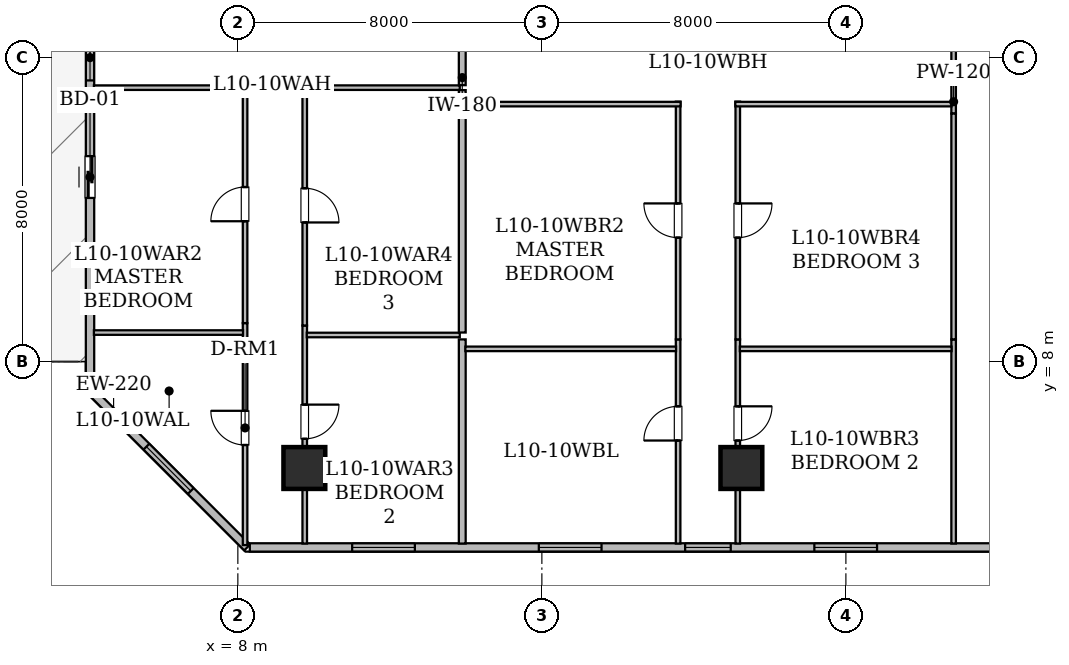
"""IFC4 building model, lengths in metres.
Left out: names, types, materials, properties, quantities, classifications, styles, units other than length and angle.
Written with IfcOpenShell. Run it as: python <this file> out.ifc"""

import sys

from ifc_helpers import new_model, si_unit, direction, frame, frame_2d, origin, origin_2d, place, context, subcontext, project, spatial, rectangle, hollow_rectangle, extrude, element, fill, save


model = new_model("IFC4")
c1 = context("Model", 3, precision=1e-05, world=origin(), true_north=direction((0.0, 1.0)))
c2 = subcontext(c1, "Body", "Model", "MODEL_VIEW")
j1 = project(units=[si_unit("LENGTHUNIT", "METRE"), si_unit("PLANEANGLEUNIT", "RADIAN")], contexts=[c1])
p1 = place(None, origin())
s1 = spatial("IfcSite", under=j1, at=p1, CompositionType="ELEMENT")
p2 = place(p1, origin())
s2 = spatial("IfcBuilding", under=s1, at=p2, CompositionType="ELEMENT")
p3 = place(p2, frame((0.0, 0.0, 44.25)))
s3 = spatial("IfcBuildingStorey", under=s2, at=p3, CompositionType="ELEMENT", Elevation=44.25)
for number, where, z_axis, x_axis in (
    (1, (9.75, 5.2, 0.0), (0.0, 0.0, 1.0), (1.0, 0.0, 0.0)),
    (2, (21.25, 5.2, 0.0), (0.0, 0.0, 1.0), (1.0, 0.0, 0.0)),
):
    element("IfcColumn", number, at=place(p3, frame(where, z_axis=z_axis, x_axis=x_axis)), inside=s3, PredefinedType="COLUMN", context=c2, shape_type="SweptSolid", body=[
        extrude(hollow_rectangle(XDim=1.1, YDim=1.1, WallThickness=0.055, at=origin_2d()), origin(), (0.0, 0.0, 1.0), 3.65),
    ])
p4 = place(p3, frame((8.246, 3.11, 0.0), z_axis=(0.0, 0.0, 1.0), x_axis=(-0.707106781187, 0.707106781187, 0.0)))
e3 = element("IfcWall", 3, at=p4, inside=s3, PredefinedType="STANDARD", context=c2, shape_type="SweptSolid", body=[
    extrude(rectangle(XDim=5.849, YDim=0.22, at=frame_2d((2.925, 0.0))), origin(), (0.0, 0.0, 1.0), 3.43),
])
p5 = place(p4, frame((2.1, 0.0, 0.85)))
e4 = element("IfcOpeningElement", 4, at=p5, cuts=e3, PredefinedType="OPENING", context=c2, shape_type="SweptSolid", body=[
    extrude(rectangle(XDim=1.65, YDim=1.55, at=frame_2d((0.825, 0.775))), frame((0.0, 0.12, 0.0), z_axis=(0.0, -1.0, 0.0), x_axis=(1.0, 0.0, 0.0)), (0.0, 0.0, 1.0), 0.24),
])
p6 = place(p3, frame((4.11, 7.317, 0.0), z_axis=(0.0, 0.0, 1.0), x_axis=(0.0, 1.0, 0.0)))
e5 = element("IfcWall", 5, at=p6, inside=s3, PredefinedType="STANDARD", context=c2, shape_type="SweptSolid", body=[
    extrude(rectangle(XDim=17.446, YDim=0.22, at=frame_2d((8.723, 0.0))), origin(), (0.0, 0.0, 1.0), 3.43),
])
p7 = place(p6, frame((4.989, 0.0, 0.0)))
e6 = element("IfcOpeningElement", 6, at=p7, cuts=e5, PredefinedType="OPENING", context=c2, shape_type="SweptSolid", body=[
    extrude(rectangle(XDim=1.1, YDim=2.2, at=frame_2d((0.55, 1.1))), frame((0.0, 0.12, 0.0), z_axis=(0.0, -1.0, 0.0), x_axis=(1.0, 0.0, 0.0)), (0.0, 0.0, 1.0), 0.24),
])
p8 = place(p6, frame((8.081, 0.0, 0.8)))
e7 = element("IfcOpeningElement", 7, at=p8, cuts=e5, PredefinedType="OPENING", context=c2, shape_type="SweptSolid", body=[
    extrude(rectangle(XDim=1.2, YDim=1.5, at=frame_2d((0.6, 0.75))), frame((0.0, 0.12, 0.0), z_axis=(0.0, -1.0, 0.0), x_axis=(1.0, 0.0, 0.0)), (0.0, 0.0, 1.0), 0.24),
])
p9 = place(p3, frame((45.683, 3.11, 0.0), z_axis=(0.0, 0.0, 1.0), x_axis=(-1.0, 0.0, 0.0)))
e8 = element("IfcWall", 8, at=p9, inside=s3, PredefinedType="STANDARD", context=c2, shape_type="SweptSolid", body=[
    extrude(rectangle(XDim=37.368, YDim=0.22, at=frame_2d((18.684, 0.0))), origin(), (0.0, 0.0, 1.0), 3.43),
])
p10 = place(p9, frame((14.508, 0.0, 0.85)))
e9 = element("IfcOpeningElement", 9, at=p10, cuts=e8, PredefinedType="OPENING", context=c2, shape_type="SweptSolid", body=[
    extrude(rectangle(XDim=1.65, YDim=1.55, at=frame_2d((0.825, 0.775))), frame((0.0, 0.12, 0.0), z_axis=(0.0, -1.0, 0.0), x_axis=(1.0, 0.0, 0.0)), (0.0, 0.0, 1.0), 0.24),
])
p11 = place(p9, frame((33.025, 0.0, 0.85)))
e10 = element("IfcOpeningElement", 10, at=p11, cuts=e8, PredefinedType="OPENING", context=c2, shape_type="SweptSolid", body=[
    extrude(rectangle(XDim=1.65, YDim=1.55, at=frame_2d((0.825, 0.775))), frame((0.0, 0.12, 0.0), z_axis=(0.0, -1.0, 0.0), x_axis=(1.0, 0.0, 0.0)), (0.0, 0.0, 1.0), 0.24),
])
p12 = place(p9, frame((24.713, 0.0, 0.8)))
e11 = element("IfcOpeningElement", 11, at=p12, cuts=e8, PredefinedType="OPENING", context=c2, shape_type="SweptSolid", body=[
    extrude(rectangle(XDim=1.2, YDim=1.5, at=frame_2d((0.6, 0.75))), frame((0.0, 0.12, 0.0), z_axis=(0.0, -1.0, 0.0), x_axis=(1.0, 0.0, 0.0)), (0.0, 0.0, 1.0), 0.24),
])
p13 = place(p9, frame((28.113, 0.0, 0.85)))
e12 = element("IfcOpeningElement", 12, at=p13, cuts=e8, PredefinedType="OPENING", context=c2, shape_type="SweptSolid", body=[
    extrude(rectangle(XDim=1.65, YDim=1.55, at=frame_2d((0.825, 0.775))), frame((0.0, 0.12, 0.0), z_axis=(0.0, -1.0, 0.0), x_axis=(1.0, 0.0, 0.0)), (0.0, 0.0, 1.0), 0.24),
])
p14 = place(p9, frame((20.863, 0.0, 0.85)))
e13 = element("IfcOpeningElement", 13, at=p14, cuts=e8, PredefinedType="OPENING", context=c2, shape_type="SweptSolid", body=[
    extrude(rectangle(XDim=1.65, YDim=1.55, at=frame_2d((0.825, 0.775))), frame((0.0, 0.12, 0.0), z_axis=(0.0, -1.0, 0.0), x_axis=(1.0, 0.0, 0.0)), (0.0, 0.0, 1.0), 0.24),
])
p15 = place(p9, frame((10.428, 0.0, 0.8)))
e14 = element("IfcOpeningElement", 14, at=p15, cuts=e8, PredefinedType="OPENING", context=c2, shape_type="SweptSolid", body=[
    extrude(rectangle(XDim=1.2, YDim=1.5, at=frame_2d((0.6, 0.75))), frame((0.0, 0.12, 0.0), z_axis=(0.0, -1.0, 0.0), x_axis=(1.0, 0.0, 0.0)), (0.0, 0.0, 1.0), 0.24),
])
p16 = place(p9, frame((6.453, 0.0, 0.85)))
e15 = element("IfcOpeningElement", 15, at=p16, cuts=e8, PredefinedType="OPENING", context=c2, shape_type="SweptSolid", body=[
    extrude(rectangle(XDim=1.65, YDim=1.55, at=frame_2d((0.825, 0.775))), frame((0.0, 0.12, 0.0), z_axis=(0.0, -1.0, 0.0), x_axis=(1.0, 0.0, 0.0)), (0.0, 0.0, 1.0), 0.24),
])
p17 = place(p9, frame((2.157, 0.0, 0.85)))
e16 = element("IfcOpeningElement", 16, at=p17, cuts=e8, PredefinedType="OPENING", context=c2, shape_type="SweptSolid", body=[
    extrude(rectangle(XDim=1.65, YDim=1.55, at=frame_2d((0.825, 0.775))), frame((0.0, 0.12, 0.0), z_axis=(0.0, -1.0, 0.0), x_axis=(1.0, 0.0, 0.0)), (0.0, 0.0, 1.0), 0.24),
])
p18 = place(p3, frame((26.835, 14.526, 0.0), z_axis=(0.0, 0.0, 1.0), x_axis=(0.0, 1.0, 0.0)))
e17 = element("IfcWall", 17, at=p18, inside=s3, PredefinedType="PARTITIONING", context=c2, shape_type="SweptSolid", body=[
    extrude(rectangle(XDim=2.078, YDim=0.12, at=frame_2d((1.039, 0.0))), origin(), (0.0, 0.0, 1.0), 3.43),
])
p19 = place(p3, frame((26.835, 3.212, 0.0), z_axis=(0.0, 0.0, 1.0), x_axis=(0.0, 1.0, 0.0)))
e18 = element("IfcWall", 18, at=p19, inside=s3, PredefinedType="PARTITIONING", context=c2, shape_type="SweptSolid", body=[
    extrude(rectangle(XDim=5.372, YDim=0.12, at=frame_2d((2.686, 0.0))), origin(), (0.0, 0.0, 1.0), 2.803),
])
p20 = place(p3, frame((26.835, 8.584, 0.0), z_axis=(0.0, 0.0, 1.0), x_axis=(0.0, 1.0, 0.0)))
e19 = element("IfcWall", 19, at=p20, inside=s3, PredefinedType="PARTITIONING", context=c2, shape_type="SweptSolid", body=[
    extrude(rectangle(XDim=5.942, YDim=0.12, at=frame_2d((2.971, 0.0))), origin(), (0.0, 0.0, 1.0), 3.43),
])
p21 = place(p3, frame((8.19, 3.172, 0.0), z_axis=(0.0, 0.0, 1.0), x_axis=(0.0, 1.0, 0.0)))
e20 = element("IfcWall", 20, at=p21, inside=s3, PredefinedType="PARTITIONING", context=c2, shape_type="SweptSolid", body=[
    extrude(rectangle(XDim=5.841, YDim=0.12, at=frame_2d((2.92, 0.0))), origin(), (0.0, 0.0, 1.0), 2.803),
])
p22 = place(p21, frame((2.633, 0.0, 0.0)))
e21 = element("IfcOpeningElement", 21, at=p22, cuts=e20, PredefinedType="OPENING", context=c2, shape_type="SweptSolid", body=[
    extrude(rectangle(XDim=0.9, YDim=2.1, at=frame_2d((0.45, 1.05))), frame((0.0, 0.07, 0.0), z_axis=(0.0, -1.0, 0.0), x_axis=(1.0, 0.0, 0.0)), (0.0, 0.0, 1.0), 0.14),
])
p23 = place(p3, frame((8.19, 9.013, 0.0), z_axis=(0.0, 0.0, 1.0), x_axis=(0.0, 1.0, 0.0)))
e22 = element("IfcWall", 22, at=p23, inside=s3, PredefinedType="PARTITIONING", context=c2, shape_type="SweptSolid", body=[
    extrude(rectangle(XDim=6.26, YDim=0.12, at=frame_2d((3.13, 0.0))), origin(), (0.0, 0.0, 1.0), 2.803),
])
p24 = place(p23, frame((2.68, 0.0, 0.0)))
e23 = element("IfcOpeningElement", 23, at=p24, cuts=e22, PredefinedType="OPENING", context=c2, shape_type="SweptSolid", body=[
    extrude(rectangle(XDim=0.9, YDim=2.1, at=frame_2d((0.45, 1.05))), frame((0.0, 0.07, 0.0), z_axis=(0.0, -1.0, 0.0), x_axis=(1.0, 0.0, 0.0)), (0.0, 0.0, 1.0), 0.14),
])
p25 = place(p3, frame((8.255, 15.208, 0.0), z_axis=(0.0, 0.0, 1.0), x_axis=(-1.0, 0.0, 0.0)))
e24 = element("IfcWall", 24, at=p25, inside=s3, PredefinedType="PARTITIONING", context=c2, shape_type="SweptSolid", body=[
    extrude(rectangle(XDim=4.043, YDim=0.12, at=frame_2d((2.021, 0.0))), origin(), (0.0, 0.0, 1.0), 2.803),
])
p26 = place(p3, frame((9.76, 8.949, 0.0), z_axis=(0.0, 0.0, 1.0), x_axis=(0.0, -1.0, 0.0)))
e25 = element("IfcWall", 25, at=p26, inside=s3, PredefinedType="PARTITIONING", context=c2, shape_type="SweptSolid", body=[
    extrude(rectangle(XDim=5.737, YDim=0.12, at=frame_2d((2.869, 0.0))), origin(), (0.0, 0.0, 1.0), 2.647),
])
p27 = place(p26, frame((2.081, 0.0, 0.0)))
e26 = element("IfcOpeningElement", 26, at=p27, cuts=e25, PredefinedType="OPENING", context=c2, shape_type="SweptSolid", body=[
    extrude(rectangle(XDim=0.9, YDim=2.1, at=frame_2d((0.45, 1.05))), frame((0.0, 0.07, 0.0), z_axis=(0.0, -1.0, 0.0), x_axis=(1.0, 0.0, 0.0)), (0.0, 0.0, 1.0), 0.14),
])
p28 = place(p3, frame((9.76, 15.273, 0.0), z_axis=(0.0, 0.0, 1.0), x_axis=(0.0, -1.0, 0.0)))
e27 = element("IfcWall", 27, at=p28, inside=s3, PredefinedType="PARTITIONING", context=c2, shape_type="SweptSolid", body=[
    extrude(rectangle(XDim=6.324, YDim=0.12, at=frame_2d((3.162, 0.0))), origin(), (0.0, 0.0, 1.0), 3.43),
])
p29 = place(p28, frame((2.712, 0.0, 0.0)))
e28 = element("IfcOpeningElement", 28, at=p29, cuts=e27, PredefinedType="OPENING", context=c2, shape_type="SweptSolid", body=[
    extrude(rectangle(XDim=0.9, YDim=2.1, at=frame_2d((0.45, 1.05))), frame((0.0, 0.07, 0.0), z_axis=(0.0, -1.0, 0.0), x_axis=(1.0, 0.0, 0.0)), (0.0, 0.0, 1.0), 0.14),
])
p30 = place(p3, frame((13.84, 15.208, 0.0), z_axis=(0.0, 0.0, 1.0), x_axis=(-1.0, 0.0, 0.0)))
e29 = element("IfcWall", 29, at=p30, inside=s3, PredefinedType="PARTITIONING", context=c2, shape_type="SweptSolid", body=[
    extrude(rectangle(XDim=4.145, YDim=0.12, at=frame_2d((2.073, 0.0))), origin(), (0.0, 0.0, 1.0), 3.43),
])
p31 = place(p3, frame((13.905, 16.604, 0.0), z_axis=(0.0, 0.0, 1.0), x_axis=(0.0, -1.0, 0.0)))
e30 = element("IfcWall", 30, at=p31, inside=s3, PredefinedType="STANDARD", context=c2, shape_type="SweptSolid", body=[
    extrude(rectangle(XDim=1.331, YDim=0.18, at=frame_2d((0.666, 0.0))), origin(), (0.0, 0.0, 1.0), 3.43),
])
p32 = place(p3, frame((4.212, 8.764, 0.0), z_axis=(0.0, 0.0, 1.0), x_axis=(1.0, 0.0, 0.0)))
e31 = element("IfcWall", 31, at=p32, inside=s3, PredefinedType="PARTITIONING", context=c2, shape_type="SweptSolid", body=[
    extrude(rectangle(XDim=3.924, YDim=0.12, at=frame_2d((1.962, 0.0))), origin(), (0.0, 0.0, 1.0), 3.43),
])
p33 = place(p3, frame((9.814, 8.7, 0.0), z_axis=(0.0, 0.0, 1.0), x_axis=(1.0, 0.0, 0.0)))
e32 = element("IfcWall", 32, at=p33, inside=s3, PredefinedType="PARTITIONING", context=c2, shape_type="SweptSolid", body=[
    extrude(rectangle(XDim=4.026, YDim=0.12, at=frame_2d((2.013, 0.0))), origin(), (0.0, 0.0, 1.0), 2.647),
])
p34 = place(p3, frame((13.905, 8.584, 0.0), z_axis=(0.0, 0.0, 1.0), x_axis=(0.0, -1.0, 0.0)))
e33 = element("IfcWall", 33, at=p34, inside=s3, PredefinedType="STANDARD", context=c2, shape_type="SweptSolid", body=[
    extrude(rectangle(XDim=5.372, YDim=0.18, at=frame_2d((2.686, 0.0))), origin(), (0.0, 0.0, 1.0), 2.803),
])
p35 = place(p3, frame((13.905, 15.143, 0.0), z_axis=(0.0, 0.0, 1.0), x_axis=(0.0, -1.0, 0.0)))
e34 = element("IfcWall", 34, at=p35, inside=s3, PredefinedType="STANDARD", context=c2, shape_type="SweptSolid", body=[
    extrude(rectangle(XDim=0.617, YDim=0.18, at=frame_2d((0.309, 0.0))), origin(), (0.0, 0.0, 1.0), 3.43),
])
p36 = place(p3, frame((13.905, 14.526, 0.0), z_axis=(0.0, 0.0, 1.0), x_axis=(0.0, -1.0, 0.0)))
e35 = element("IfcWall", 35, at=p36, inside=s3, PredefinedType="STANDARD", context=c2, shape_type="SweptSolid", body=[
    extrude(rectangle(XDim=5.761, YDim=0.18, at=frame_2d((2.88, 0.0))), origin(), (0.0, 0.0, 1.0), 2.647),
])
p37 = place(p3, frame((19.585, 3.212, 0.0), z_axis=(0.0, 0.0, 1.0), x_axis=(0.0, 1.0, 0.0)))
e36 = element("IfcWall", 36, at=p37, inside=s3, PredefinedType="PARTITIONING", context=c2, shape_type="SweptSolid", body=[
    extrude(rectangle(XDim=5.372, YDim=0.12, at=frame_2d((2.686, 0.0))), origin(), (0.0, 0.0, 1.0), 2.803),
])
p38 = place(p37, frame((2.711, 0.0, 0.0)))
e37 = element("IfcOpeningElement", 37, at=p38, cuts=e36, PredefinedType="OPENING", context=c2, shape_type="SweptSolid", body=[
    extrude(rectangle(XDim=0.9, YDim=2.1, at=frame_2d((0.45, 1.05))), frame((0.0, 0.07, 0.0), z_axis=(0.0, -1.0, 0.0), x_axis=(1.0, 0.0, 0.0)), (0.0, 0.0, 1.0), 0.14),
])
p39 = place(p3, frame((19.585, 8.584, 0.0), z_axis=(0.0, 0.0, 1.0), x_axis=(0.0, 1.0, 0.0)))
e38 = element("IfcWall", 38, at=p39, inside=s3, PredefinedType="PARTITIONING", context=c2, shape_type="SweptSolid", body=[
    extrude(rectangle(XDim=6.256, YDim=0.12, at=frame_2d((3.128, 0.0))), origin(), (0.0, 0.0, 1.0), 2.647),
])
p40 = place(p39, frame((2.678, 0.0, 0.0)))
e39 = element("IfcOpeningElement", 39, at=p40, cuts=e38, PredefinedType="OPENING", context=c2, shape_type="SweptSolid", body=[
    extrude(rectangle(XDim=0.9, YDim=2.1, at=frame_2d((0.45, 1.05))), frame((0.0, 0.07, 0.0), z_axis=(0.0, -1.0, 0.0), x_axis=(1.0, 0.0, 0.0)), (0.0, 0.0, 1.0), 0.14),
])
p41 = place(p3, frame((19.65, 14.775, 0.0), z_axis=(0.0, 0.0, 1.0), x_axis=(-1.0, 0.0, 0.0)))
e40 = element("IfcWall", 40, at=p41, inside=s3, PredefinedType="PARTITIONING", context=c2, shape_type="SweptSolid", body=[
    extrude(rectangle(XDim=5.663, YDim=0.12, at=frame_2d((2.832, 0.0))), origin(), (0.0, 0.0, 1.0), 2.647),
])
p42 = place(p3, frame((21.155, 8.584, 0.0), z_axis=(0.0, 0.0, 1.0), x_axis=(0.0, -1.0, 0.0)))
e41 = element("IfcWall", 41, at=p42, inside=s3, PredefinedType="PARTITIONING", context=c2, shape_type="SweptSolid", body=[
    extrude(rectangle(XDim=5.372, YDim=0.12, at=frame_2d((2.686, 0.0))), origin(), (0.0, 0.0, 1.0), 2.647),
])
p43 = place(p42, frame((1.761, 0.0, 0.0)))
e42 = element("IfcOpeningElement", 42, at=p43, cuts=e41, PredefinedType="OPENING", context=c2, shape_type="SweptSolid", body=[
    extrude(rectangle(XDim=0.9, YDim=2.1, at=frame_2d((0.45, 1.05))), frame((0.0, 0.07, 0.0), z_axis=(0.0, -1.0, 0.0), x_axis=(1.0, 0.0, 0.0)), (0.0, 0.0, 1.0), 0.14),
])
p44 = place(p3, frame((21.155, 14.84, 0.0), z_axis=(0.0, 0.0, 1.0), x_axis=(0.0, -1.0, 0.0)))
e43 = element("IfcWall", 43, at=p44, inside=s3, PredefinedType="PARTITIONING", context=c2, shape_type="SweptSolid", body=[
    extrude(rectangle(XDim=6.256, YDim=0.12, at=frame_2d((3.128, 0.0))), origin(), (0.0, 0.0, 1.0), 3.43),
])
p45 = place(p44, frame((2.678, 0.0, 0.0)))
e44 = element("IfcOpeningElement", 44, at=p45, cuts=e43, PredefinedType="OPENING", context=c2, shape_type="SweptSolid", body=[
    extrude(rectangle(XDim=0.9, YDim=2.1, at=frame_2d((0.45, 1.05))), frame((0.0, 0.07, 0.0), z_axis=(0.0, -1.0, 0.0), x_axis=(1.0, 0.0, 0.0)), (0.0, 0.0, 1.0), 0.14),
])
p46 = place(p3, frame((26.781, 14.775, 0.0), z_axis=(0.0, 0.0, 1.0), x_axis=(-1.0, 0.0, 0.0)))
e45 = element("IfcWall", 45, at=p46, inside=s3, PredefinedType="PARTITIONING", context=c2, shape_type="SweptSolid", body=[
    extrude(rectangle(XDim=5.691, YDim=0.12, at=frame_2d((2.845, 0.0))), origin(), (0.0, 0.0, 1.0), 3.43),
])
p47 = place(p3, frame((13.987, 8.335, 0.0), z_axis=(0.0, 0.0, 1.0), x_axis=(1.0, 0.0, 0.0)))
e46 = element("IfcWall", 46, at=p47, inside=s3, PredefinedType="PARTITIONING", context=c2, shape_type="SweptSolid", body=[
    extrude(rectangle(XDim=5.544, YDim=0.12, at=frame_2d((2.772, 0.0))), origin(), (0.0, 0.0, 1.0), 3.43),
])
p48 = place(p3, frame((21.209, 8.335, 0.0), z_axis=(0.0, 0.0, 1.0), x_axis=(1.0, 0.0, 0.0)))
e47 = element("IfcWall", 47, at=p48, inside=s3, PredefinedType="PARTITIONING", context=c2, shape_type="SweptSolid", body=[
    extrude(rectangle(XDim=5.572, YDim=0.12, at=frame_2d((2.786, 0.0))), origin(), (0.0, 0.0, 1.0), 3.43),
])
p49 = place(p7, origin())
e48 = element("IfcDoor", 48, at=p49, inside=s3, OperationType="SLIDING_TO_LEFT", PredefinedType="DOOR", context=c2, shape_type="SweptSolid", body=[
    extrude(rectangle(XDim=1.1, YDim=2.2, at=frame_2d((0.55, 1.1))), frame((0.0, 0.025, 0.0), z_axis=(0.0, -1.0, 0.0), x_axis=(1.0, 0.0, 0.0)), (0.0, 0.0, 1.0), 0.05),
])
fill(e6, e48)
p50 = place(p8, origin())
e49 = element("IfcWindow", 49, at=p50, inside=s3, PartitioningType="SINGLE_PANEL", PredefinedType="WINDOW", context=c2, shape_type="SweptSolid", body=[
    extrude(rectangle(XDim=1.2, YDim=1.5, at=frame_2d((0.6, 0.75))), frame((0.0, 0.03, 0.0), z_axis=(0.0, -1.0, 0.0), x_axis=(1.0, 0.0, 0.0)), (0.0, 0.0, 1.0), 0.06),
])
fill(e7, e49)
p51 = place(p5, origin())
e50 = element("IfcWindow", 50, at=p51, inside=s3, PartitioningType="SINGLE_PANEL", PredefinedType="WINDOW", context=c2, shape_type="SweptSolid", body=[
    extrude(rectangle(XDim=1.65, YDim=1.55, at=frame_2d((0.825, 0.775))), frame((0.0, 0.03, 0.0), z_axis=(0.0, -1.0, 0.0), x_axis=(1.0, 0.0, 0.0)), (0.0, 0.0, 1.0), 0.06),
])
fill(e4, e50)
p52 = place(p11, origin())
e51 = element("IfcWindow", 51, at=p52, inside=s3, PartitioningType="SINGLE_PANEL", PredefinedType="WINDOW", context=c2, shape_type="SweptSolid", body=[
    extrude(rectangle(XDim=1.65, YDim=1.55, at=frame_2d((0.825, 0.775))), frame((0.0, 0.03, 0.0), z_axis=(0.0, -1.0, 0.0), x_axis=(1.0, 0.0, 0.0)), (0.0, 0.0, 1.0), 0.06),
])
fill(e10, e51)
p53 = place(p12, origin())
e52 = element("IfcWindow", 52, at=p53, inside=s3, PartitioningType="SINGLE_PANEL", PredefinedType="WINDOW", context=c2, shape_type="SweptSolid", body=[
    extrude(rectangle(XDim=1.2, YDim=1.5, at=frame_2d((0.6, 0.75))), frame((0.0, 0.03, 0.0), z_axis=(0.0, -1.0, 0.0), x_axis=(1.0, 0.0, 0.0)), (0.0, 0.0, 1.0), 0.06),
])
fill(e11, e52)
p54 = place(p13, origin())
e53 = element("IfcWindow", 53, at=p54, inside=s3, PartitioningType="SINGLE_PANEL", PredefinedType="WINDOW", context=c2, shape_type="SweptSolid", body=[
    extrude(rectangle(XDim=1.65, YDim=1.55, at=frame_2d((0.825, 0.775))), frame((0.0, 0.03, 0.0), z_axis=(0.0, -1.0, 0.0), x_axis=(1.0, 0.0, 0.0)), (0.0, 0.0, 1.0), 0.06),
])
fill(e12, e53)
p55 = place(p14, origin())
e54 = element("IfcWindow", 54, at=p55, inside=s3, PartitioningType="SINGLE_PANEL", PredefinedType="WINDOW", context=c2, shape_type="SweptSolid", body=[
    extrude(rectangle(XDim=1.65, YDim=1.55, at=frame_2d((0.825, 0.775))), frame((0.0, 0.03, 0.0), z_axis=(0.0, -1.0, 0.0), x_axis=(1.0, 0.0, 0.0)), (0.0, 0.0, 1.0), 0.06),
])
fill(e13, e54)
p56 = place(p22, origin())
e55 = element("IfcDoor", 55, at=p56, inside=s3, OperationType="SINGLE_SWING_RIGHT", PredefinedType="DOOR", context=c2, shape_type="SweptSolid", body=[
    extrude(rectangle(XDim=0.9, YDim=2.1, at=frame_2d((0.45, 1.05))), frame((0.0, 0.025, 0.0), z_axis=(0.0, -1.0, 0.0), x_axis=(1.0, 0.0, 0.0)), (0.0, 0.0, 1.0), 0.05),
])
fill(e21, e55)
p57 = place(p24, origin())
e56 = element("IfcDoor", 56, at=p57, inside=s3, OperationType="SINGLE_SWING_LEFT", PredefinedType="DOOR", context=c2, shape_type="SweptSolid", body=[
    extrude(rectangle(XDim=0.9, YDim=2.1, at=frame_2d((0.45, 1.05))), frame((0.0, 0.025, 0.0), z_axis=(0.0, -1.0, 0.0), x_axis=(1.0, 0.0, 0.0)), (0.0, 0.0, 1.0), 0.05),
])
fill(e23, e56)
p58 = place(p27, origin())
e57 = element("IfcDoor", 57, at=p58, inside=s3, OperationType="SINGLE_SWING_LEFT", PredefinedType="DOOR", context=c2, shape_type="SweptSolid", body=[
    extrude(rectangle(XDim=0.9, YDim=2.1, at=frame_2d((0.45, 1.05))), frame((0.0, 0.025, 0.0), z_axis=(0.0, -1.0, 0.0), x_axis=(1.0, 0.0, 0.0)), (0.0, 0.0, 1.0), 0.05),
])
fill(e26, e57)
p59 = place(p29, origin())
e58 = element("IfcDoor", 58, at=p59, inside=s3, OperationType="SINGLE_SWING_RIGHT", PredefinedType="DOOR", context=c2, shape_type="SweptSolid", body=[
    extrude(rectangle(XDim=0.9, YDim=2.1, at=frame_2d((0.45, 1.05))), frame((0.0, 0.025, 0.0), z_axis=(0.0, -1.0, 0.0), x_axis=(1.0, 0.0, 0.0)), (0.0, 0.0, 1.0), 0.05),
])
fill(e28, e58)
p60 = place(p38, origin())
e59 = element("IfcDoor", 59, at=p60, inside=s3, OperationType="SINGLE_SWING_LEFT", PredefinedType="DOOR", context=c2, shape_type="SweptSolid", body=[
    extrude(rectangle(XDim=0.9, YDim=2.1, at=frame_2d((0.45, 1.05))), frame((0.0, 0.025, 0.0), z_axis=(0.0, -1.0, 0.0), x_axis=(1.0, 0.0, 0.0)), (0.0, 0.0, 1.0), 0.05),
])
fill(e37, e59)
p61 = place(p40, origin())
e60 = element("IfcDoor", 60, at=p61, inside=s3, OperationType="SINGLE_SWING_RIGHT", PredefinedType="DOOR", context=c2, shape_type="SweptSolid", body=[
    extrude(rectangle(XDim=0.9, YDim=2.1, at=frame_2d((0.45, 1.05))), frame((0.0, 0.025, 0.0), z_axis=(0.0, -1.0, 0.0), x_axis=(1.0, 0.0, 0.0)), (0.0, 0.0, 1.0), 0.05),
])
fill(e39, e60)
p62 = place(p43, origin())
e61 = element("IfcDoor", 61, at=p62, inside=s3, OperationType="SINGLE_SWING_LEFT", PredefinedType="DOOR", context=c2, shape_type="SweptSolid", body=[
    extrude(rectangle(XDim=0.9, YDim=2.1, at=frame_2d((0.45, 1.05))), frame((0.0, 0.025, 0.0), z_axis=(0.0, -1.0, 0.0), x_axis=(1.0, 0.0, 0.0)), (0.0, 0.0, 1.0), 0.05),
])
fill(e42, e61)
p63 = place(p45, origin())
e62 = element("IfcDoor", 62, at=p63, inside=s3, OperationType="SINGLE_SWING_LEFT", PredefinedType="DOOR", context=c2, shape_type="SweptSolid", body=[
    extrude(rectangle(XDim=0.9, YDim=2.1, at=frame_2d((0.45, 1.05))), frame((0.0, 0.025, 0.0), z_axis=(0.0, -1.0, 0.0), x_axis=(1.0, 0.0, 0.0)), (0.0, 0.0, 1.0), 0.05),
])
fill(e44, e62)
save(model, sys.argv[1])
